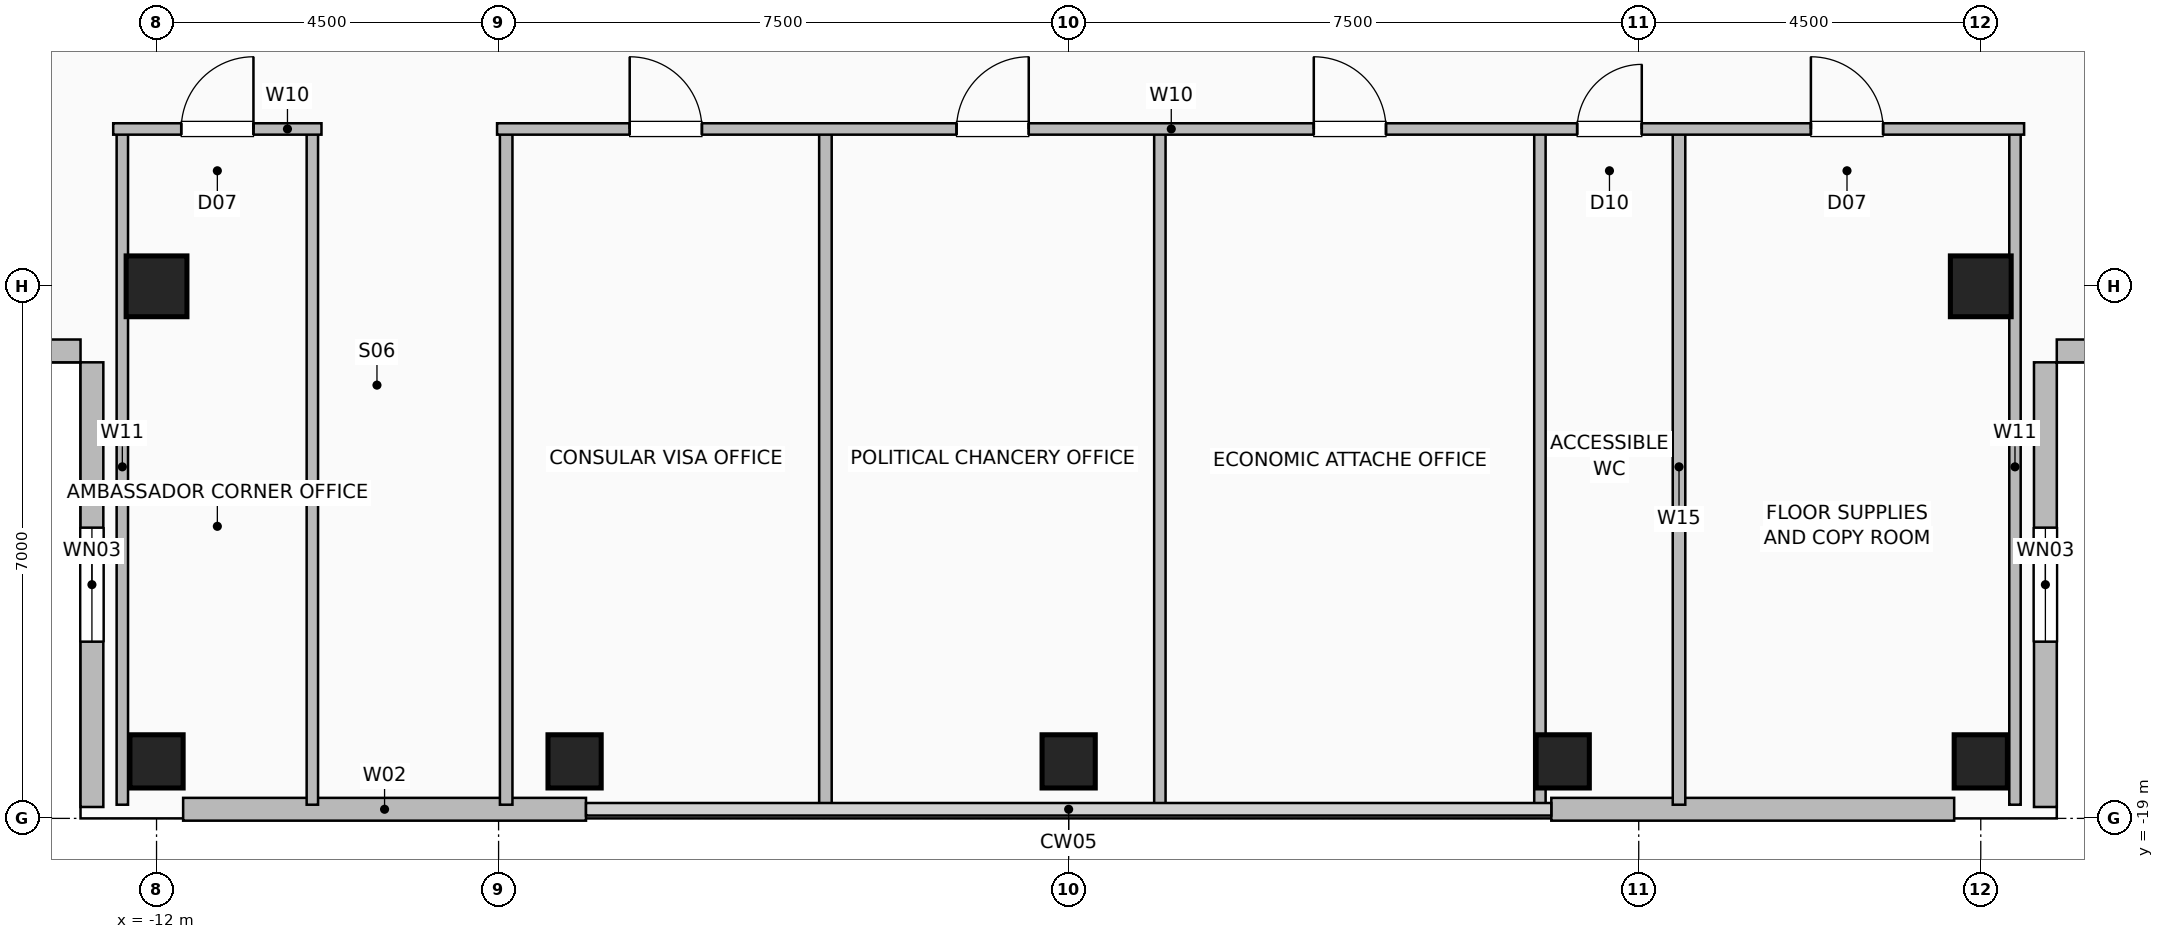
"""IFC4 building model, lengths in metres.
Left out: names, types, materials, properties, quantities, classifications, styles, units other than length and angle.
Written with IfcOpenShell. Run it as: python <this file> out.ifc"""

import sys

from ifc_helpers import new_model, si_unit, direction, frame, frame_2d, origin, origin_2d, place, context, subcontext, project, spatial, rectangle, hollow_rectangle, extrude, element, fill, save


model = new_model("IFC4")
c1 = context("Model", 3, precision=1e-05, world=origin(), true_north=direction((0.0, 1.0)))
c2 = subcontext(c1, "Body", "Model", "MODEL_VIEW")
j1 = project(units=[si_unit("LENGTHUNIT", "METRE"), si_unit("PLANEANGLEUNIT", "RADIAN")], contexts=[c1])
p1 = place(None, origin())
s1 = spatial("IfcSite", under=j1, at=p1, CompositionType="ELEMENT")
p2 = place(p1, origin())
s2 = spatial("IfcBuilding", under=s1, at=p2, CompositionType="ELEMENT")
p3 = place(p2, frame((0.0, 0.0, 236.0)))
s3 = spatial("IfcBuildingStorey", under=s2, at=p3, CompositionType="ELEMENT", Elevation=236.0)
for number, where, z_axis, x_axis in (
    (1, (-12.0, -18.25, 0.0), (0.0, 0.0, 1.0), (1.0, 0.0, 0.0)),
    (2, (-6.5, -18.25, 0.0), (0.0, 0.0, 1.0), (1.0, 0.0, 0.0)),
    (3, (0.0, -18.25, 0.0), (0.0, 0.0, 1.0), (1.0, 0.0, 0.0)),
    (4, (6.5, -18.25, 0.0), (0.0, 0.0, 1.0), (1.0, 0.0, 0.0)),
    (5, (12.0, -18.25, 0.0), (0.0, 0.0, 1.0), (1.0, 0.0, 0.0)),
):
    element("IfcColumn", number, at=place(p3, frame(where, z_axis=z_axis, x_axis=x_axis)), inside=s3, PredefinedType="COLUMN", context=c2, shape_type="SweptSolid", body=[
        extrude(hollow_rectangle(XDim=0.7, YDim=0.7, WallThickness=0.035, at=origin_2d()), origin(), (0.0, 0.0, 1.0), 3.6),
    ])
for number, where, z_axis, x_axis in (
    (6, (-12.0, -12.0, 0.0), (0.0, 0.0, 1.0), (1.0, 0.0, 0.0)),
    (7, (12.0, -12.0, 0.0), (0.0, 0.0, 1.0), (1.0, 0.0, 0.0)),
):
    element("IfcColumn", number, at=place(p3, frame(where, z_axis=z_axis, x_axis=x_axis)), inside=s3, PredefinedType="COLUMN", context=c2, shape_type="SweptSolid", body=[
        extrude(hollow_rectangle(XDim=0.8, YDim=0.8, WallThickness=0.04, at=origin_2d()), origin(), (0.0, 0.0, 1.0), 3.6),
    ])
for number, where, z_axis, x_axis in (
    (8, (-11.65, -18.88, 0.0), (0.0, 0.0, 1.0), (1.0, 0.0, 0.0)),
    (9, (6.35, -18.88, 0.0), (0.0, 0.0, 1.0), (1.0, 0.0, 0.0)),
):
    element("IfcWall", number, at=place(p3, frame(where, z_axis=z_axis, x_axis=x_axis)), inside=s3, PredefinedType="SOLIDWALL", context=c2, shape_type="SweptSolid", body=[
        extrude(rectangle(XDim=5.3, YDim=0.3, at=frame_2d((2.65, 0.0))), origin(), (0.0, 0.0, 1.0), 3.36),
    ])
p4 = place(p3, frame((-12.85, -18.85, 0.0), z_axis=(0.0, 0.0, 1.0), x_axis=(0.0, 1.0, 0.0)))
e10 = element("IfcWall", 10, at=p4, inside=s3, PredefinedType="SOLIDWALL", context=c2, shape_type="SweptSolid", body=[
    extrude(rectangle(XDim=5.85, YDim=0.3, at=frame_2d((2.925, 0.0))), origin(), (0.0, 0.0, 1.0), 3.36),
])
p5 = place(p4, frame((2.175, 0.0, 0.9)))
e11 = element("IfcOpeningElement", 11, at=p5, cuts=e10, PredefinedType="OPENING", context=c2, shape_type="SweptSolid", body=[
    extrude(rectangle(XDim=1.5, YDim=1.8, at=frame_2d((0.75, 0.9))), frame((0.0, 0.16, 0.0), z_axis=(0.0, -1.0, 0.0), x_axis=(1.0, 0.0, 0.0)), (0.0, 0.0, 1.0), 0.32),
])
p6 = place(p3, frame((-18.85, -12.85, 0.0), z_axis=(0.0, 0.0, 1.0), x_axis=(1.0, 0.0, 0.0)))
e12 = element("IfcWall", 12, at=p6, inside=s3, PredefinedType="SOLIDWALL", context=c2, shape_type="SweptSolid", body=[
    extrude(rectangle(XDim=5.85, YDim=0.3, at=frame_2d((2.925, 0.0))), origin(), (0.0, 0.0, 1.0), 3.36),
])
p7 = place(p3, frame((12.85, -18.85, 0.0), z_axis=(0.0, 0.0, 1.0), x_axis=(0.0, 1.0, 0.0)))
e13 = element("IfcWall", 13, at=p7, inside=s3, PredefinedType="SOLIDWALL", context=c2, shape_type="SweptSolid", body=[
    extrude(rectangle(XDim=5.85, YDim=0.3, at=frame_2d((2.925, 0.0))), origin(), (0.0, 0.0, 1.0), 3.36),
])
p8 = place(p7, frame((2.175, 0.0, 0.9)))
e14 = element("IfcOpeningElement", 14, at=p8, cuts=e13, PredefinedType="OPENING", context=c2, shape_type="SweptSolid", body=[
    extrude(rectangle(XDim=1.5, YDim=1.8, at=frame_2d((0.75, 0.9))), frame((0.0, 0.16, 0.0), z_axis=(0.0, -1.0, 0.0), x_axis=(1.0, 0.0, 0.0)), (0.0, 0.0, 1.0), 0.32),
])
p9 = place(p3, frame((18.85, -12.85, 0.0), z_axis=(0.0, 0.0, 1.0), x_axis=(-1.0, 0.0, 0.0)))
e15 = element("IfcWall", 15, at=p9, inside=s3, PredefinedType="SOLIDWALL", context=c2, shape_type="SweptSolid", body=[
    extrude(rectangle(XDim=5.85, YDim=0.3, at=frame_2d((2.925, 0.0))), origin(), (0.0, 0.0, 1.0), 3.36),
])
for number, where, z_axis, x_axis in (
    (16, (-12.45, -18.82, 0.0), (0.0, 0.0, 1.0), (0.0, 1.0, 0.0)),
    (17, (-9.95, -18.82, 0.0), (0.0, 0.0, 1.0), (0.0, 1.0, 0.0)),
):
    element("IfcWall", number, at=place(p3, frame(where, z_axis=z_axis, x_axis=x_axis)), inside=s3, PredefinedType="PARTITIONING", context=c2, shape_type="SweptSolid", body=[
        extrude(rectangle(XDim=8.89, YDim=0.15, at=frame_2d((4.445, 0.0))), origin(), (0.0, 0.0, 1.0), 3.36),
    ])
p10 = place(p3, frame((-12.57, -9.93, 0.0), z_axis=(0.0, 0.0, 1.0), x_axis=(1.0, 0.0, 0.0)))
e18 = element("IfcWall", 18, at=p10, inside=s3, PredefinedType="PARTITIONING", context=c2, shape_type="SweptSolid", body=[
    extrude(rectangle(XDim=2.74, YDim=0.15, at=frame_2d((1.37, 0.0))), origin(), (0.0, 0.0, 1.0), 3.36),
])
p11 = place(p10, frame((0.895, 0.0, 0.0)))
e19 = element("IfcOpeningElement", 19, at=p11, cuts=e18, PredefinedType="OPENING", context=c2, shape_type="SweptSolid", body=[
    extrude(rectangle(XDim=0.95, YDim=2.06, at=frame_2d((0.475, 1.03))), frame((0.0, 0.085, 0.0), z_axis=(0.0, -1.0, 0.0), x_axis=(1.0, 0.0, 0.0)), (0.0, 0.0, 1.0), 0.17),
])
for number, where, z_axis, x_axis in (
    (20, (8.03, -18.82, 0.0), (0.0, 0.0, 1.0), (0.0, 1.0, 0.0)),
    (21, (-7.4, -18.82, 0.0), (0.0, 0.0, 1.0), (0.0, 1.0, 0.0)),
    (22, (-3.2, -18.82, 0.0), (0.0, 0.0, 1.0), (0.0, 1.0, 0.0)),
):
    element("IfcWall", number, at=place(p3, frame(where, z_axis=z_axis, x_axis=x_axis)), inside=s3, PredefinedType="PLUMBINGWALL", context=c2, shape_type="SweptSolid", body=[
        extrude(rectangle(XDim=8.89, YDim=0.165, at=frame_2d((4.445, 0.0))), origin(), (0.0, 0.0, 1.0), 3.36),
    ])
for number, where, z_axis, x_axis in (
    (23, (1.2, -18.82, 0.0), (0.0, 0.0, 1.0), (0.0, 1.0, 0.0)),
    (24, (6.2, -18.82, 0.0), (0.0, 0.0, 1.0), (0.0, 1.0, 0.0)),
    (25, (12.45, -18.82, 0.0), (0.0, 0.0, 1.0), (0.0, 1.0, 0.0)),
):
    element("IfcWall", number, at=place(p3, frame(where, z_axis=z_axis, x_axis=x_axis)), inside=s3, PredefinedType="PARTITIONING", context=c2, shape_type="SweptSolid", body=[
        extrude(rectangle(XDim=8.89, YDim=0.15, at=frame_2d((4.445, 0.0))), origin(), (0.0, 0.0, 1.0), 3.36),
    ])
p12 = place(p3, frame((-7.52, -9.93, 0.0), z_axis=(0.0, 0.0, 1.0), x_axis=(1.0, 0.0, 0.0)))
e26 = element("IfcWall", 26, at=p12, inside=s3, PredefinedType="PARTITIONING", context=c2, shape_type="SweptSolid", body=[
    extrude(rectangle(XDim=20.09, YDim=0.15, at=frame_2d((10.045, 0.0))), origin(), (0.0, 0.0, 1.0), 3.36),
])
p13 = place(p12, frame((1.745, 0.0, 0.0)))
e27 = element("IfcOpeningElement", 27, at=p13, cuts=e26, PredefinedType="OPENING", context=c2, shape_type="SweptSolid", body=[
    extrude(rectangle(XDim=0.95, YDim=2.06, at=frame_2d((0.475, 1.03))), frame((0.0, 0.085, 0.0), z_axis=(0.0, -1.0, 0.0), x_axis=(1.0, 0.0, 0.0)), (0.0, 0.0, 1.0), 0.17),
])
p14 = place(p12, frame((6.045, 0.0, 0.0)))
e28 = element("IfcOpeningElement", 28, at=p14, cuts=e26, PredefinedType="OPENING", context=c2, shape_type="SweptSolid", body=[
    extrude(rectangle(XDim=0.95, YDim=2.06, at=frame_2d((0.475, 1.03))), frame((0.0, 0.085, 0.0), z_axis=(0.0, -1.0, 0.0), x_axis=(1.0, 0.0, 0.0)), (0.0, 0.0, 1.0), 0.17),
])
p15 = place(p12, frame((10.745, 0.0, 0.0)))
e29 = element("IfcOpeningElement", 29, at=p15, cuts=e26, PredefinedType="OPENING", context=c2, shape_type="SweptSolid", body=[
    extrude(rectangle(XDim=0.95, YDim=2.06, at=frame_2d((0.475, 1.03))), frame((0.0, 0.085, 0.0), z_axis=(0.0, -1.0, 0.0), x_axis=(1.0, 0.0, 0.0)), (0.0, 0.0, 1.0), 0.17),
])
p16 = place(p12, frame((14.21, 0.0, 0.0)))
e30 = element("IfcOpeningElement", 30, at=p16, cuts=e26, PredefinedType="OPENING", context=c2, shape_type="SweptSolid", body=[
    extrude(rectangle(XDim=0.85, YDim=2.05, at=frame_2d((0.425, 1.025))), frame((0.0, 0.085, 0.0), z_axis=(0.0, -1.0, 0.0), x_axis=(1.0, 0.0, 0.0)), (0.0, 0.0, 1.0), 0.17),
])
p17 = place(p12, frame((17.285, 0.0, 0.0)))
e31 = element("IfcOpeningElement", 31, at=p17, cuts=e26, PredefinedType="OPENING", context=c2, shape_type="SweptSolid", body=[
    extrude(rectangle(XDim=0.95, YDim=2.06, at=frame_2d((0.475, 1.03))), frame((0.0, 0.085, 0.0), z_axis=(0.0, -1.0, 0.0), x_axis=(1.0, 0.0, 0.0)), (0.0, 0.0, 1.0), 0.17),
])
p18 = place(p5, origin())
e32 = element("IfcWindow", 32, at=p18, inside=s3, PartitioningType="SINGLE_PANEL", PredefinedType="WINDOW", context=c2, shape_type="SweptSolid", body=[
    extrude(rectangle(XDim=1.5, YDim=1.8, at=frame_2d((0.75, 0.9))), frame((0.0, 0.03, 0.0), z_axis=(0.0, -1.0, 0.0), x_axis=(1.0, 0.0, 0.0)), (0.0, 0.0, 1.0), 0.06),
])
fill(e11, e32)
p19 = place(p8, origin())
e33 = element("IfcWindow", 33, at=p19, inside=s3, PartitioningType="SINGLE_PANEL", PredefinedType="WINDOW", context=c2, shape_type="SweptSolid", body=[
    extrude(rectangle(XDim=1.5, YDim=1.8, at=frame_2d((0.75, 0.9))), frame((0.0, 0.03, 0.0), z_axis=(0.0, -1.0, 0.0), x_axis=(1.0, 0.0, 0.0)), (0.0, 0.0, 1.0), 0.06),
])
fill(e14, e33)
p20 = place(p11, origin())
e34 = element("IfcDoor", 34, at=p20, inside=s3, OperationType="SINGLE_SWING_RIGHT", PredefinedType="DOOR", context=c2, shape_type="SweptSolid", body=[
    extrude(rectangle(XDim=0.95, YDim=2.06, at=frame_2d((0.475, 1.03))), frame((0.0, 0.025, 0.0), z_axis=(0.0, -1.0, 0.0), x_axis=(1.0, 0.0, 0.0)), (0.0, 0.0, 1.0), 0.05),
])
fill(e19, e34)
p21 = place(p13, origin())
e35 = element("IfcDoor", 35, at=p21, inside=s3, OperationType="SINGLE_SWING_LEFT", PredefinedType="DOOR", context=c2, shape_type="SweptSolid", body=[
    extrude(rectangle(XDim=0.95, YDim=2.06, at=frame_2d((0.475, 1.03))), frame((0.0, 0.025, 0.0), z_axis=(0.0, -1.0, 0.0), x_axis=(1.0, 0.0, 0.0)), (0.0, 0.0, 1.0), 0.05),
])
fill(e27, e35)
p22 = place(p14, origin())
e36 = element("IfcDoor", 36, at=p22, inside=s3, OperationType="SINGLE_SWING_RIGHT", PredefinedType="DOOR", context=c2, shape_type="SweptSolid", body=[
    extrude(rectangle(XDim=0.95, YDim=2.06, at=frame_2d((0.475, 1.03))), frame((0.0, 0.025, 0.0), z_axis=(0.0, -1.0, 0.0), x_axis=(1.0, 0.0, 0.0)), (0.0, 0.0, 1.0), 0.05),
])
fill(e28, e36)
p23 = place(p15, origin())
e37 = element("IfcDoor", 37, at=p23, inside=s3, OperationType="SINGLE_SWING_LEFT", PredefinedType="DOOR", context=c2, shape_type="SweptSolid", body=[
    extrude(rectangle(XDim=0.95, YDim=2.06, at=frame_2d((0.475, 1.03))), frame((0.0, 0.025, 0.0), z_axis=(0.0, -1.0, 0.0), x_axis=(1.0, 0.0, 0.0)), (0.0, 0.0, 1.0), 0.05),
])
fill(e29, e37)
p24 = place(p16, origin())
e38 = element("IfcDoor", 38, at=p24, inside=s3, OperationType="SINGLE_SWING_RIGHT", PredefinedType="DOOR", context=c2, shape_type="SweptSolid", body=[
    extrude(rectangle(XDim=0.85, YDim=2.05, at=frame_2d((0.425, 1.025))), frame((0.0, 0.025, 0.0), z_axis=(0.0, -1.0, 0.0), x_axis=(1.0, 0.0, 0.0)), (0.0, 0.0, 1.0), 0.05),
])
fill(e30, e38)
p25 = place(p17, origin())
e39 = element("IfcDoor", 39, at=p25, inside=s3, OperationType="SINGLE_SWING_LEFT", PredefinedType="DOOR", context=c2, shape_type="SweptSolid", body=[
    extrude(rectangle(XDim=0.95, YDim=2.06, at=frame_2d((0.475, 1.03))), frame((0.0, 0.025, 0.0), z_axis=(0.0, -1.0, 0.0), x_axis=(1.0, 0.0, 0.0)), (0.0, 0.0, 1.0), 0.05),
])
fill(e31, e39)
save(model, sys.argv[1])
